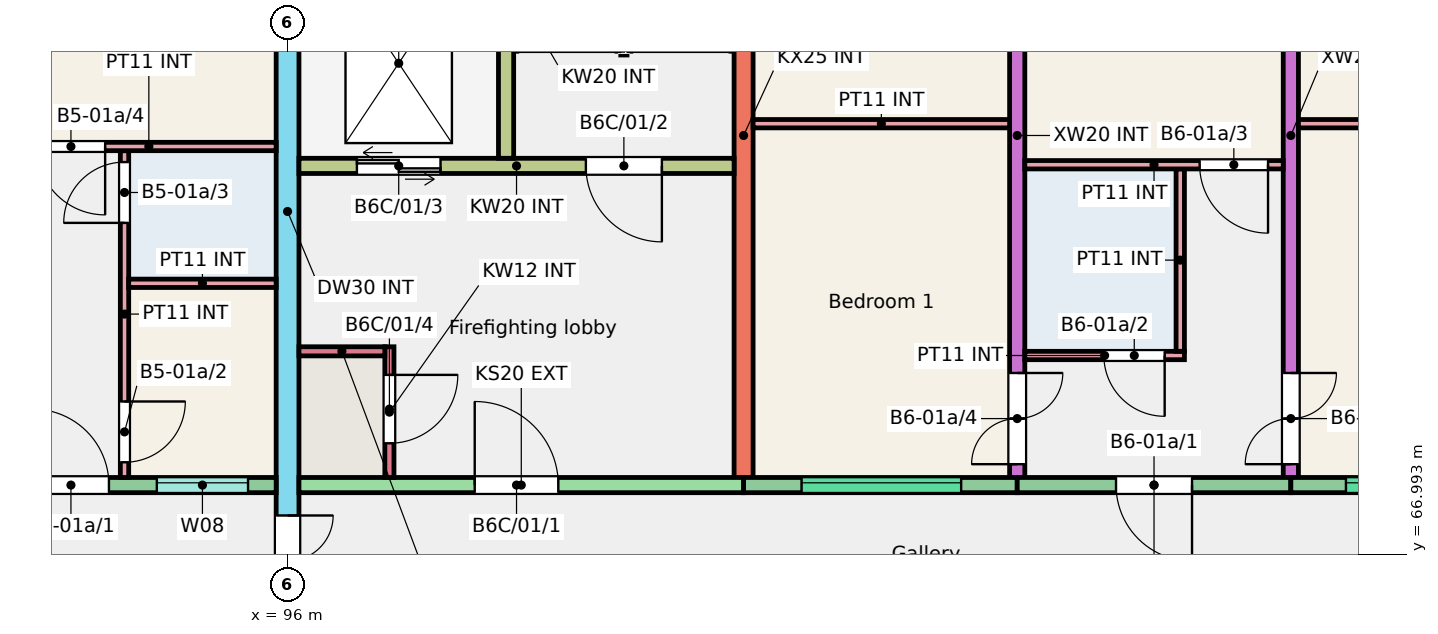
"""IFC4 building model, lengths in metres.
Left out: names, types, materials, properties, quantities, classifications, styles, units other than length and angle.
Written with IfcOpenShell. Run it as: python <this file> out.ifc"""

import sys

from ifc_helpers import new_model, si_unit, direction, frame, frame_2d, origin, place, context, subcontext, project, spatial, rectangle, extrude, element, fill, save


model = new_model("IFC4")
c1 = context("Model", 3, precision=1e-05, world=origin(), true_north=direction((0.0, 1.0)))
c2 = subcontext(c1, "Body", "Model", "MODEL_VIEW")
j1 = project(units=[si_unit("LENGTHUNIT", "METRE"), si_unit("PLANEANGLEUNIT", "RADIAN")], contexts=[c1])
p1 = place(None, origin())
s1 = spatial("IfcSite", under=j1, at=p1, CompositionType="ELEMENT")
p2 = place(p1, origin())
s2 = spatial("IfcBuilding", under=s1, at=p2, CompositionType="ELEMENT")
p3 = place(p2, frame((0.0, 0.0, 3.0)))
s3 = spatial("IfcBuildingStorey", under=s2, at=p3, CompositionType="ELEMENT", Elevation=3.0)
p4 = place(p3, frame((96.0, 66.0, 0.0), z_axis=(0.0, 0.0, 1.0), x_axis=(0.0, 1.0, 0.0)))
e1 = element("IfcWall", 1, at=p4, inside=s3, PredefinedType="SHEAR", context=c2, shape_type="SweptSolid", body=[
    extrude(rectangle(XDim=11.0, YDim=0.3, at=frame_2d((5.5, 0.0))), origin(), (0.0, 0.0, 1.0), 3.0),
])
p5 = place(p4, frame((0.3, 0.0, 0.0)))
e2 = element("IfcOpeningElement", 2, at=p5, cuts=e1, PredefinedType="OPENING", context=c2, shape_type="SweptSolid", body=[
    extrude(rectangle(XDim=1.2, YDim=2.1, at=frame_2d((0.6, 1.05))), frame((0.0, 0.16, 0.0), z_axis=(0.0, -1.0, 0.0), x_axis=(1.0, 0.0, 0.0)), (0.0, 0.0, 1.0), 0.32),
])
p6 = place(p3, frame((102.0, 68.0, 0.0), z_axis=(0.0, 0.0, 1.0), x_axis=(0.0, 1.0, 0.0)))
e3 = element("IfcWall", 3, at=p6, inside=s3, PredefinedType="SHEAR", context=c2, shape_type="SweptSolid", body=[
    extrude(rectangle(XDim=9.0, YDim=0.25, at=frame_2d((4.5, 0.0))), origin(), (0.0, 0.0, 1.0), 3.0),
])
p7 = place(p3, frame((105.6, 68.0, 0.0), z_axis=(0.0, 0.0, 1.0), x_axis=(0.0, 1.0, 0.0)))
e4 = element("IfcWall", 4, at=p7, inside=s3, PredefinedType="SHEAR", context=c2, shape_type="SweptSolid", body=[
    extrude(rectangle(XDim=9.0, YDim=0.2, at=frame_2d((4.5, 0.0))), origin(), (0.0, 0.0, 1.0), 3.0),
])
p8 = place(p7, frame((0.175, 0.0, 0.0)))
e5 = element("IfcOpeningElement", 5, at=p8, cuts=e4, PredefinedType="OPENING", context=c2, shape_type="SweptSolid", body=[
    extrude(rectangle(XDim=1.2, YDim=2.1, at=frame_2d((0.6, 1.05))), frame((0.0, 0.11, 0.0), z_axis=(0.0, -1.0, 0.0), x_axis=(1.0, 0.0, 0.0)), (0.0, 0.0, 1.0), 0.22),
])
p9 = place(p7, frame((6.4, 0.0, 0.0)))
e6 = element("IfcOpeningElement", 6, at=p9, cuts=e4, PredefinedType="OPENING", context=c2, shape_type="SweptSolid", body=[
    extrude(rectangle(XDim=1.2, YDim=2.1, at=frame_2d((0.6, 1.05))), frame((0.0, 0.11, 0.0), z_axis=(0.0, -1.0, 0.0), x_axis=(1.0, 0.0, 0.0)), (0.0, 0.0, 1.0), 0.22),
])
p10 = place(p3, frame((109.2, 68.0, 0.0), z_axis=(0.0, 0.0, 1.0), x_axis=(0.0, 1.0, 0.0)))
e7 = element("IfcWall", 7, at=p10, inside=s3, PredefinedType="SHEAR", context=c2, shape_type="SweptSolid", body=[
    extrude(rectangle(XDim=9.0, YDim=0.2, at=frame_2d((4.5, 0.0))), origin(), (0.0, 0.0, 1.0), 3.0),
])
p11 = place(p10, frame((0.175, 0.0, 0.0)))
e8 = element("IfcOpeningElement", 8, at=p11, cuts=e7, PredefinedType="OPENING", context=c2, shape_type="SweptSolid", body=[
    extrude(rectangle(XDim=1.2, YDim=2.1, at=frame_2d((0.6, 1.05))), frame((0.0, 0.11, 0.0), z_axis=(0.0, -1.0, 0.0), x_axis=(1.0, 0.0, 0.0)), (0.0, 0.0, 1.0), 0.22),
])
p12 = place(p10, frame((6.4, 0.0, 0.0)))
e9 = element("IfcOpeningElement", 9, at=p12, cuts=e7, PredefinedType="OPENING", context=c2, shape_type="SweptSolid", body=[
    extrude(rectangle(XDim=1.2, YDim=2.1, at=frame_2d((0.6, 1.05))), frame((0.0, 0.11, 0.0), z_axis=(0.0, -1.0, 0.0), x_axis=(1.0, 0.0, 0.0)), (0.0, 0.0, 1.0), 0.22),
])
p13 = place(p3, frame((92.4, 67.9, 0.0), z_axis=(0.0, 0.0, 1.0), x_axis=(1.0, 0.0, 0.0)))
e10 = element("IfcWall", 10, at=p13, inside=s3, PredefinedType="SOLIDWALL", context=c2, shape_type="SweptSolid", body=[
    extrude(rectangle(XDim=3.45, YDim=0.2, at=frame_2d((1.725, 0.0))), origin(), (0.0, 0.0, 1.0), 3.0),
])
p14 = place(p13, frame((1.88, 0.0, 1.1)))
e11 = element("IfcOpeningElement", 11, at=p14, cuts=e10, PredefinedType="OPENING", context=c2, shape_type="SweptSolid", body=[
    extrude(rectangle(XDim=1.2, YDim=1.3, at=frame_2d((0.6, 0.65))), frame((0.0, 0.11, 0.0), z_axis=(0.0, -1.0, 0.0), x_axis=(1.0, 0.0, 0.0)), (0.0, 0.0, 1.0), 0.22),
])
p15 = place(p13, frame((0.25, 0.0, 0.0)))
e12 = element("IfcOpeningElement", 12, at=p15, cuts=e10, PredefinedType="OPENING", context=c2, shape_type="SweptSolid", body=[
    extrude(rectangle(XDim=1.0, YDim=2.1, at=frame_2d((0.5, 1.05))), frame((0.0, 0.11, 0.0), z_axis=(0.0, -1.0, 0.0), x_axis=(1.0, 0.0, 0.0)), (0.0, 0.0, 1.0), 0.22),
])
p16 = place(p3, frame((96.15, 67.9, 0.0), z_axis=(0.0, 0.0, 1.0), x_axis=(1.0, 0.0, 0.0)))
e13 = element("IfcWall", 13, at=p16, inside=s3, PredefinedType="SHEAR", context=c2, shape_type="SweptSolid", body=[
    extrude(rectangle(XDim=5.85, YDim=0.2, at=frame_2d((2.925, 0.0))), origin(), (0.0, 0.0, 1.0), 3.0),
])
p17 = place(p16, frame((2.312, 0.0, 0.0)))
e14 = element("IfcOpeningElement", 14, at=p17, cuts=e13, PredefinedType="OPENING", context=c2, shape_type="SweptSolid", body=[
    extrude(rectangle(XDim=1.1, YDim=2.1, at=frame_2d((0.55, 1.05))), frame((0.0, 0.11, 0.0), z_axis=(0.0, -1.0, 0.0), x_axis=(1.0, 0.0, 0.0)), (0.0, 0.0, 1.0), 0.22),
])
p18 = place(p3, frame((96.15, 72.1, 0.0), z_axis=(0.0, 0.0, 1.0), x_axis=(1.0, 0.0, 0.0)))
e15 = element("IfcWall", 15, at=p18, inside=s3, PredefinedType="SHEAR", context=c2, shape_type="SweptSolid", body=[
    extrude(rectangle(XDim=5.725, YDim=0.2, at=frame_2d((2.863, 0.0))), origin(), (0.0, 0.0, 1.0), 3.0),
])
p19 = place(p18, frame((3.775, 0.0, 0.0)))
e16 = element("IfcOpeningElement", 16, at=p19, cuts=e15, PredefinedType="OPENING", context=c2, shape_type="SweptSolid", body=[
    extrude(rectangle(XDim=1.0, YDim=2.1, at=frame_2d((0.5, 1.05))), frame((0.0, 0.11, 0.0), z_axis=(0.0, -1.0, 0.0), x_axis=(1.0, 0.0, 0.0)), (0.0, 0.0, 1.0), 0.22),
])
p20 = place(p18, frame((0.762, 0.0, 0.0)))
e17 = element("IfcOpeningElement", 17, at=p20, cuts=e15, PredefinedType="OPENING", context=c2, shape_type="SweptSolid", body=[
    extrude(rectangle(XDim=1.1, YDim=2.1, at=frame_2d((0.55, 1.05))), frame((0.0, 0.11, 0.0), z_axis=(0.0, -1.0, 0.0), x_axis=(1.0, 0.0, 0.0)), (0.0, 0.0, 1.0), 0.22),
])
p21 = place(p3, frame((98.875, 72.2, 0.0), z_axis=(0.0, 0.0, 1.0), x_axis=(0.0, 1.0, 0.0)))
e18 = element("IfcWall", 18, at=p21, inside=s3, PredefinedType="SHEAR", context=c2, shape_type="SweptSolid", body=[
    extrude(rectangle(XDim=4.8, YDim=0.2, at=frame_2d((2.4, 0.0))), origin(), (0.0, 0.0, 1.0), 3.0),
])
p22 = place(p3, frame((97.34, 68.0, 0.0), z_axis=(0.0, 0.0, 1.0), x_axis=(0.0, 1.0, 0.0)))
e19 = element("IfcWall", 19, at=p22, inside=s3, PredefinedType="SHEAR", context=c2, shape_type="SweptSolid", body=[
    extrude(rectangle(XDim=1.72, YDim=0.12, at=frame_2d((0.86, 0.0))), origin(), (0.0, 0.0, 1.0), 3.0),
])
p23 = place(p22, frame((0.45, 0.0, 0.0)))
e20 = element("IfcOpeningElement", 20, at=p23, cuts=e19, PredefinedType="OPENING", context=c2, shape_type="SweptSolid", body=[
    extrude(rectangle(XDim=0.9, YDim=2.1, at=frame_2d((0.45, 1.05))), frame((0.0, 0.07, 0.0), z_axis=(0.0, -1.0, 0.0), x_axis=(1.0, 0.0, 0.0)), (0.0, 0.0, 1.0), 0.14),
])
p24 = place(p3, frame((96.15, 69.66, 0.0), z_axis=(0.0, 0.0, 1.0), x_axis=(1.0, 0.0, 0.0)))
e21 = element("IfcWall", 21, at=p24, inside=s3, PredefinedType="SHEAR", context=c2, shape_type="SweptSolid", body=[
    extrude(rectangle(XDim=1.13, YDim=0.12, at=frame_2d((0.565, 0.0))), origin(), (0.0, 0.0, 1.0), 3.0),
])
p25 = place(p3, frame((102.0, 67.9, 0.0), z_axis=(0.0, 0.0, 1.0), x_axis=(1.0, 0.0, 0.0)))
e22 = element("IfcWall", 22, at=p25, inside=s3, PredefinedType="SOLIDWALL", context=c2, shape_type="SweptSolid", body=[
    extrude(rectangle(XDim=3.6, YDim=0.2, at=frame_2d((1.8, 0.0))), origin(), (0.0, 0.0, 1.0), 3.0),
])
p26 = place(p25, frame((0.762, 0.0, 1.2)))
e23 = element("IfcOpeningElement", 23, at=p26, cuts=e22, PredefinedType="OPENING", context=c2, shape_type="SweptSolid", body=[
    extrude(rectangle(XDim=2.1, YDim=1.2, at=frame_2d((1.05, 0.6))), frame((0.0, 0.11, 0.0), z_axis=(0.0, -1.0, 0.0), x_axis=(1.0, 0.0, 0.0)), (0.0, 0.0, 1.0), 0.22),
])
p27 = place(p3, frame((105.6, 67.9, 0.0), z_axis=(0.0, 0.0, 1.0), x_axis=(1.0, 0.0, 0.0)))
e24 = element("IfcWall", 24, at=p27, inside=s3, PredefinedType="SOLIDWALL", context=c2, shape_type="SweptSolid", body=[
    extrude(rectangle(XDim=3.6, YDim=0.2, at=frame_2d((1.8, 0.0))), origin(), (0.0, 0.0, 1.0), 3.0),
])
p28 = place(p27, frame((1.3, 0.0, 0.0)))
e25 = element("IfcOpeningElement", 25, at=p28, cuts=e24, PredefinedType="OPENING", context=c2, shape_type="SweptSolid", body=[
    extrude(rectangle(XDim=1.0, YDim=2.1, at=frame_2d((0.5, 1.05))), frame((0.0, 0.11, 0.0), z_axis=(0.0, -1.0, 0.0), x_axis=(1.0, 0.0, 0.0)), (0.0, 0.0, 1.0), 0.22),
])
p29 = place(p3, frame((109.2, 67.9, 0.0), z_axis=(0.0, 0.0, 1.0), x_axis=(1.0, 0.0, 0.0)))
e26 = element("IfcWall", 26, at=p29, inside=s3, PredefinedType="SOLIDWALL", context=c2, shape_type="SweptSolid", body=[
    extrude(rectangle(XDim=3.45, YDim=0.2, at=frame_2d((1.725, 0.0))), origin(), (0.0, 0.0, 1.0), 3.0),
])
p30 = place(p29, frame((0.725, 0.0, 1.2)))
e27 = element("IfcOpeningElement", 27, at=p30, cuts=e26, PredefinedType="OPENING", context=c2, shape_type="SweptSolid", body=[
    extrude(rectangle(XDim=2.1, YDim=1.2, at=frame_2d((1.05, 0.6))), frame((0.0, 0.11, 0.0), z_axis=(0.0, -1.0, 0.0), x_axis=(1.0, 0.0, 0.0)), (0.0, 0.0, 1.0), 0.22),
])
p31 = place(p3, frame((93.855, 68.0, 0.0), z_axis=(0.0, 0.0, 1.0), x_axis=(0.0, 1.0, 0.0)))
e28 = element("IfcWall", 28, at=p31, inside=s3, PredefinedType="PARTITIONING", context=c2, shape_type="SweptSolid", body=[
    extrude(rectangle(XDim=4.3, YDim=0.11, at=frame_2d((2.15, 0.0))), origin(), (0.0, 0.0, 1.0), 2.8),
])
p32 = place(p31, frame((0.2, 0.0, 0.0)))
e29 = element("IfcOpeningElement", 29, at=p32, cuts=e28, PredefinedType="OPENING", context=c2, shape_type="SweptSolid", body=[
    extrude(rectangle(XDim=0.8, YDim=2.1, at=frame_2d((0.4, 1.05))), frame((0.0, 0.065, 0.0), z_axis=(0.0, -1.0, 0.0), x_axis=(1.0, 0.0, 0.0)), (0.0, 0.0, 1.0), 0.13),
])
p33 = place(p31, frame((3.35, 0.0, 0.0)))
e30 = element("IfcOpeningElement", 30, at=p33, cuts=e28, PredefinedType="OPENING", context=c2, shape_type="SweptSolid", body=[
    extrude(rectangle(XDim=0.8, YDim=2.1, at=frame_2d((0.4, 1.05))), frame((0.0, 0.065, 0.0), z_axis=(0.0, -1.0, 0.0), x_axis=(1.0, 0.0, 0.0)), (0.0, 0.0, 1.0), 0.13),
])
p34 = place(p3, frame((93.91, 70.555, 0.0), z_axis=(0.0, 0.0, 1.0), x_axis=(1.0, 0.0, 0.0)))
e31 = element("IfcWall", 31, at=p34, inside=s3, PredefinedType="PARTITIONING", context=c2, shape_type="SweptSolid", body=[
    extrude(rectangle(XDim=1.94, YDim=0.11, at=frame_2d((0.97, 0.0))), origin(), (0.0, 0.0, 1.0), 2.8),
])
p35 = place(p3, frame((92.5, 72.355, 0.0), z_axis=(0.0, 0.0, 1.0), x_axis=(1.0, 0.0, 0.0)))
e32 = element("IfcWall", 32, at=p35, inside=s3, PredefinedType="PARTITIONING", context=c2, shape_type="SweptSolid", body=[
    extrude(rectangle(XDim=3.35, YDim=0.11, at=frame_2d((1.675, 0.0))), origin(), (0.0, 0.0, 1.0), 2.8),
])
p36 = place(p35, frame((0.2, 0.0, 0.0)))
e33 = element("IfcOpeningElement", 33, at=p36, cuts=e32, PredefinedType="OPENING", context=c2, shape_type="SweptSolid", body=[
    extrude(rectangle(XDim=0.9, YDim=2.1, at=frame_2d((0.45, 1.05))), frame((0.0, 0.065, 0.0), z_axis=(0.0, -1.0, 0.0), x_axis=(1.0, 0.0, 0.0)), (0.0, 0.0, 1.0), 0.13),
])
p37 = place(p3, frame((105.7, 69.605, 0.0), z_axis=(0.0, 0.0, 1.0), x_axis=(1.0, 0.0, 0.0)))
e34 = element("IfcWall", 34, at=p37, inside=s3, PredefinedType="PARTITIONING", context=c2, shape_type="SweptSolid", body=[
    extrude(rectangle(XDim=2.1, YDim=0.11, at=frame_2d((1.05, 0.0))), origin(), (0.0, 0.0, 1.0), 2.8),
])
p38 = place(p37, frame((1.04, 0.0, 0.0)))
e35 = element("IfcOpeningElement", 35, at=p38, cuts=e34, PredefinedType="OPENING", context=c2, shape_type="SweptSolid", body=[
    extrude(rectangle(XDim=0.8, YDim=2.1, at=frame_2d((0.4, 1.05))), frame((0.0, 0.065, 0.0), z_axis=(0.0, -1.0, 0.0), x_axis=(1.0, 0.0, 0.0)), (0.0, 0.0, 1.0), 0.13),
])
p39 = place(p3, frame((107.745, 69.66, 0.0), z_axis=(0.0, 0.0, 1.0), x_axis=(0.0, 1.0, 0.0)))
e36 = element("IfcWall", 36, at=p39, inside=s3, PredefinedType="PARTITIONING", context=c2, shape_type="SweptSolid", body=[
    extrude(rectangle(XDim=2.4, YDim=0.11, at=frame_2d((1.2, 0.0))), origin(), (0.0, 0.0, 1.0), 2.8),
])
p40 = place(p3, frame((105.7, 72.115, 0.0), z_axis=(0.0, 0.0, 1.0), x_axis=(1.0, 0.0, 0.0)))
e37 = element("IfcWall", 37, at=p40, inside=s3, PredefinedType="PARTITIONING", context=c2, shape_type="SweptSolid", body=[
    extrude(rectangle(XDim=3.4, YDim=0.11, at=frame_2d((1.7, 0.0))), origin(), (0.0, 0.0, 1.0), 2.8),
])
p41 = place(p40, frame((2.3, 0.0, 0.0)))
e38 = element("IfcOpeningElement", 38, at=p41, cuts=e37, PredefinedType="OPENING", context=c2, shape_type="SweptSolid", body=[
    extrude(rectangle(XDim=0.9, YDim=2.1, at=frame_2d((0.45, 1.05))), frame((0.0, 0.065, 0.0), z_axis=(0.0, -1.0, 0.0), x_axis=(1.0, 0.0, 0.0)), (0.0, 0.0, 1.0), 0.13),
])
p42 = place(p3, frame((102.125, 72.655, 0.0), z_axis=(0.0, 0.0, 1.0), x_axis=(1.0, 0.0, 0.0)))
e39 = element("IfcWall", 39, at=p42, inside=s3, PredefinedType="PARTITIONING", context=c2, shape_type="SweptSolid", body=[
    extrude(rectangle(XDim=3.375, YDim=0.11, at=frame_2d((1.688, 0.0))), origin(), (0.0, 0.0, 1.0), 2.8),
])
p43 = place(p3, frame((109.3, 72.655, 0.0), z_axis=(0.0, 0.0, 1.0), x_axis=(1.0, 0.0, 0.0)))
e40 = element("IfcWall", 40, at=p43, inside=s3, PredefinedType="PARTITIONING", context=c2, shape_type="SweptSolid", body=[
    extrude(rectangle(XDim=3.35, YDim=0.11, at=frame_2d((1.675, 0.0))), origin(), (0.0, 0.0, 1.0), 2.8),
])
p44 = place(p14, origin())
e41 = element("IfcWindow", 41, at=p44, inside=s3, PartitioningType="SINGLE_PANEL", PredefinedType="WINDOW", context=c2, shape_type="SweptSolid", body=[
    extrude(rectangle(XDim=1.2, YDim=1.3, at=frame_2d((0.6, 0.65))), frame((0.0, 0.06, 0.0), z_axis=(0.0, -1.0, 0.0), x_axis=(1.0, 0.0, 0.0)), (0.0, 0.0, 1.0), 0.06),
])
fill(e11, e41)
p45 = place(p26, origin())
e42 = element("IfcWindow", 42, at=p45, inside=s3, PartitioningType="SINGLE_PANEL", PredefinedType="WINDOW", context=c2, shape_type="SweptSolid", body=[
    extrude(rectangle(XDim=2.1, YDim=1.2, at=frame_2d((1.05, 0.6))), frame((0.0, 0.06, 0.0), z_axis=(0.0, -1.0, 0.0), x_axis=(1.0, 0.0, 0.0)), (0.0, 0.0, 1.0), 0.06),
])
fill(e23, e42)
p46 = place(p30, origin())
e43 = element("IfcWindow", 43, at=p46, inside=s3, PartitioningType="SINGLE_PANEL", PredefinedType="WINDOW", context=c2, shape_type="SweptSolid", body=[
    extrude(rectangle(XDim=2.1, YDim=1.2, at=frame_2d((1.05, 0.6))), frame((0.0, 0.06, 0.0), z_axis=(0.0, -1.0, 0.0), x_axis=(1.0, 0.0, 0.0)), (0.0, 0.0, 1.0), 0.06),
])
fill(e27, e43)
p47 = place(p15, origin())
e44 = element("IfcDoor", 44, at=p47, inside=s3, OperationType="SINGLE_SWING_LEFT", PredefinedType="DOOR", context=c2, shape_type="SweptSolid", body=[
    extrude(rectangle(XDim=1.0, YDim=2.1, at=frame_2d((0.5, 1.05))), frame((0.0, 0.025, 0.0), z_axis=(0.0, -1.0, 0.0), x_axis=(1.0, 0.0, 0.0)), (0.0, 0.0, 1.0), 0.05),
])
fill(e12, e44)
p48 = place(p32, origin())
e45 = element("IfcDoor", 45, at=p48, inside=s3, OperationType="SINGLE_SWING_RIGHT", PredefinedType="DOOR", context=c2, shape_type="SweptSolid", body=[
    extrude(rectangle(XDim=0.8, YDim=2.1, at=frame_2d((0.4, 1.05))), frame((0.0, 0.025, 0.0), z_axis=(0.0, -1.0, 0.0), x_axis=(1.0, 0.0, 0.0)), (0.0, 0.0, 1.0), 0.05),
])
fill(e29, e45)
p49 = place(p33, origin())
e46 = element("IfcDoor", 46, at=p49, inside=s3, OperationType="SINGLE_SWING_LEFT", PredefinedType="DOOR", context=c2, shape_type="SweptSolid", body=[
    extrude(rectangle(XDim=0.8, YDim=2.1, at=frame_2d((0.4, 1.05))), frame((0.0, 0.025, 0.0), z_axis=(0.0, -1.0, 0.0), x_axis=(1.0, 0.0, 0.0)), (0.0, 0.0, 1.0), 0.05),
])
fill(e30, e46)
p50 = place(p36, origin())
e47 = element("IfcDoor", 47, at=p50, inside=s3, OperationType="SINGLE_SWING_RIGHT", PredefinedType="DOOR", context=c2, shape_type="SweptSolid", body=[
    extrude(rectangle(XDim=0.9, YDim=2.1, at=frame_2d((0.45, 1.05))), frame((0.0, 0.025, 0.0), z_axis=(0.0, -1.0, 0.0), x_axis=(1.0, 0.0, 0.0)), (0.0, 0.0, 1.0), 0.05),
])
fill(e33, e47)
p51 = place(p28, origin())
e48 = element("IfcDoor", 48, at=p51, inside=s3, OperationType="SINGLE_SWING_RIGHT", PredefinedType="DOOR", context=c2, shape_type="SweptSolid", body=[
    extrude(rectangle(XDim=1.0, YDim=2.1, at=frame_2d((0.5, 1.05))), frame((0.0, 0.025, 0.0), z_axis=(0.0, -1.0, 0.0), x_axis=(1.0, 0.0, 0.0)), (0.0, 0.0, 1.0), 0.05),
])
fill(e25, e48)
p52 = place(p38, origin())
e49 = element("IfcDoor", 49, at=p52, inside=s3, OperationType="SINGLE_SWING_RIGHT", PredefinedType="DOOR", context=c2, shape_type="SweptSolid", body=[
    extrude(rectangle(XDim=0.8, YDim=2.1, at=frame_2d((0.4, 1.05))), frame((0.0, 0.025, 0.0), z_axis=(0.0, -1.0, 0.0), x_axis=(1.0, 0.0, 0.0)), (0.0, 0.0, 1.0), 0.05),
])
fill(e35, e49)
p53 = place(p41, origin())
e50 = element("IfcDoor", 50, at=p53, inside=s3, OperationType="SINGLE_SWING_RIGHT", PredefinedType="DOOR", context=c2, shape_type="SweptSolid", body=[
    extrude(rectangle(XDim=0.9, YDim=2.1, at=frame_2d((0.45, 1.05))), frame((0.0, 0.025, 0.0), z_axis=(0.0, -1.0, 0.0), x_axis=(1.0, 0.0, 0.0)), (0.0, 0.0, 1.0), 0.05),
])
fill(e38, e50)
p54 = place(p8, origin())
e51 = element("IfcDoor", 51, at=p54, inside=s3, OperationType="DOUBLE_DOOR_SINGLE_SWING", PredefinedType="DOOR", context=c2, shape_type="SweptSolid", body=[
    extrude(rectangle(XDim=1.2, YDim=2.1, at=frame_2d((0.6, 1.05))), frame((0.0, 0.025, 0.0), z_axis=(0.0, -1.0, 0.0), x_axis=(1.0, 0.0, 0.0)), (0.0, 0.0, 1.0), 0.05),
])
fill(e5, e51)
p55 = place(p11, origin())
e52 = element("IfcDoor", 52, at=p55, inside=s3, OperationType="DOUBLE_DOOR_SINGLE_SWING", PredefinedType="DOOR", context=c2, shape_type="SweptSolid", body=[
    extrude(rectangle(XDim=1.2, YDim=2.1, at=frame_2d((0.6, 1.05))), frame((0.0, 0.025, 0.0), z_axis=(0.0, -1.0, 0.0), x_axis=(1.0, 0.0, 0.0)), (0.0, 0.0, 1.0), 0.05),
])
fill(e8, e52)
p56 = place(p17, origin())
e53 = element("IfcDoor", 53, at=p56, inside=s3, OperationType="SINGLE_SWING_LEFT", PredefinedType="DOOR", context=c2, shape_type="SweptSolid", body=[
    extrude(rectangle(XDim=1.1, YDim=2.1, at=frame_2d((0.55, 1.05))), frame((0.0, 0.025, 0.0), z_axis=(0.0, -1.0, 0.0), x_axis=(1.0, 0.0, 0.0)), (0.0, 0.0, 1.0), 0.05),
])
fill(e14, e53)
p57 = place(p19, origin())
e54 = element("IfcDoor", 54, at=p57, inside=s3, OperationType="SINGLE_SWING_RIGHT", PredefinedType="DOOR", context=c2, shape_type="SweptSolid", body=[
    extrude(rectangle(XDim=1.0, YDim=2.1, at=frame_2d((0.5, 1.05))), frame((0.0, 0.025, 0.0), z_axis=(0.0, -1.0, 0.0), x_axis=(1.0, 0.0, 0.0)), (0.0, 0.0, 1.0), 0.05),
])
fill(e16, e54)
p58 = place(p20, origin())
e55 = element("IfcDoor", 55, at=p58, inside=s3, OperationType="DOUBLE_DOOR_SLIDING", PredefinedType="DOOR", context=c2, shape_type="SweptSolid", body=[
    extrude(rectangle(XDim=1.1, YDim=2.1, at=frame_2d((0.55, 1.05))), frame((0.0, 0.025, 0.0), z_axis=(0.0, -1.0, 0.0), x_axis=(1.0, 0.0, 0.0)), (0.0, 0.0, 1.0), 0.05),
])
fill(e17, e55)
p59 = place(p23, origin())
e56 = element("IfcDoor", 56, at=p59, inside=s3, OperationType="SINGLE_SWING_RIGHT", PredefinedType="DOOR", context=c2, shape_type="SweptSolid", body=[
    extrude(rectangle(XDim=0.9, YDim=2.1, at=frame_2d((0.45, 1.05))), frame((0.0, 0.025, 0.0), z_axis=(0.0, -1.0, 0.0), x_axis=(1.0, 0.0, 0.0)), (0.0, 0.0, 1.0), 0.05),
])
fill(e20, e56)
p60 = place(p5, origin())
e57 = element("IfcDoor", 57, at=p60, inside=s3, OperationType="DOUBLE_DOOR_SINGLE_SWING", PredefinedType="DOOR", context=c2, shape_type="SweptSolid", body=[
    extrude(rectangle(XDim=1.2, YDim=2.1, at=frame_2d((0.6, 1.05))), frame((0.0, 0.025, 0.0), z_axis=(0.0, -1.0, 0.0), x_axis=(1.0, 0.0, 0.0)), (0.0, 0.0, 1.0), 0.05),
])
fill(e2, e57)
save(model, sys.argv[1])
